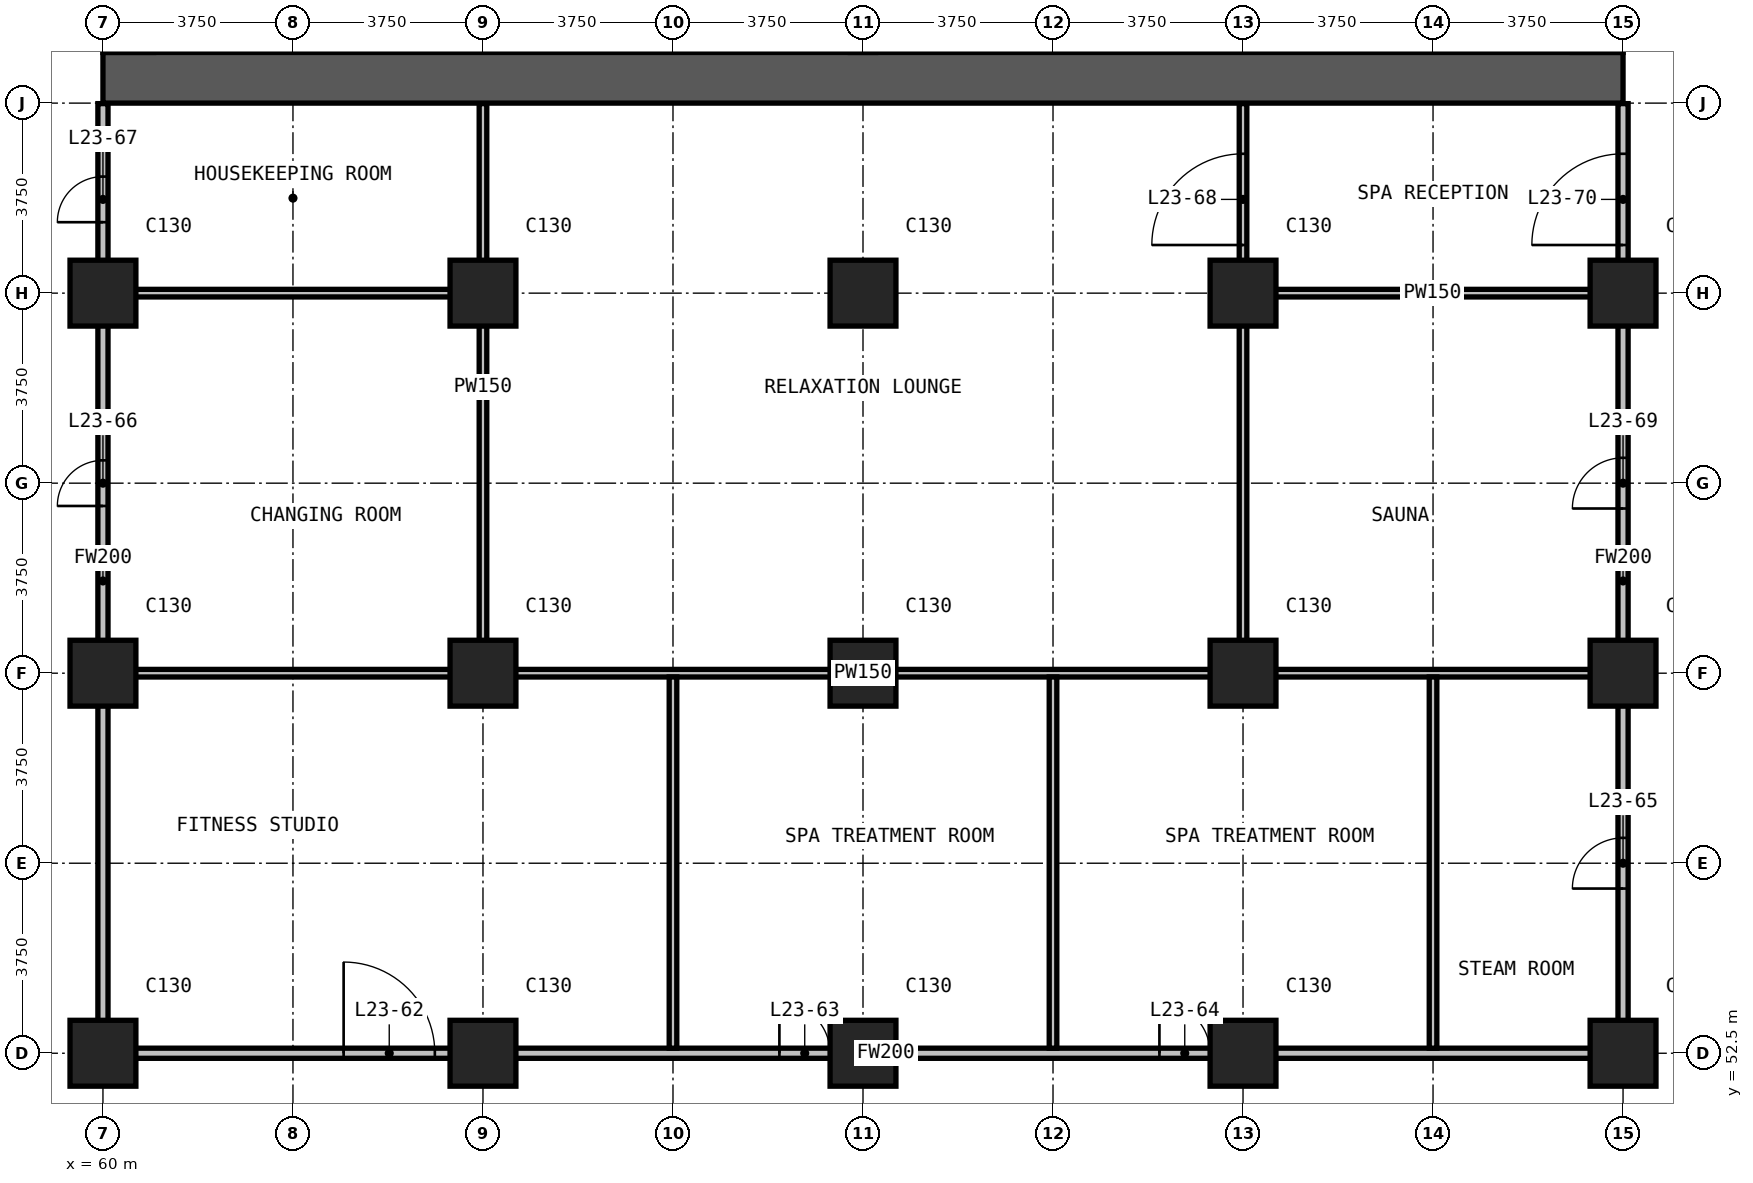
"""IFC4 building model, lengths in metres.
Left out: names, types, materials, properties, quantities, classifications, styles, units other than length and angle.
Written with IfcOpenShell. Run it as: python <this file> out.ifc"""

import sys

from ifc_helpers import new_model, si_unit, direction, frame, frame_2d, origin, origin_2d, place, context, subcontext, project, spatial, rectangle, extrude, element, fill, save


model = new_model("IFC4")
c1 = context("Model", 3, precision=1e-05, world=origin(), true_north=direction((0.0, 1.0)))
c2 = subcontext(c1, "Body", "Model", "MODEL_VIEW")
j1 = project(units=[si_unit("LENGTHUNIT", "METRE"), si_unit("PLANEANGLEUNIT", "RADIAN")], contexts=[c1])
p1 = place(None, origin())
s1 = spatial("IfcSite", under=j1, at=p1, CompositionType="ELEMENT")
p2 = place(p1, origin())
s2 = spatial("IfcBuilding", under=s1, at=p2, CompositionType="ELEMENT")
p3 = place(p2, frame((0.0, 0.0, 95.6)))
s3 = spatial("IfcBuildingStorey", under=s2, at=p3, CompositionType="ELEMENT", Elevation=95.6)
for number, where, z_axis, x_axis in (
    (1, (60.0, 52.5, 0.0), (0.0, 0.0, 1.0), (1.0, 0.0, 0.0)),
    (2, (60.0, 60.0, 0.0), (0.0, 0.0, 1.0), (1.0, 0.0, 0.0)),
    (3, (60.0, 67.5, 0.0), (0.0, 0.0, 1.0), (1.0, 0.0, 0.0)),
    (4, (67.5, 52.5, 0.0), (0.0, 0.0, 1.0), (1.0, 0.0, 0.0)),
    (5, (67.5, 60.0, 0.0), (0.0, 0.0, 1.0), (1.0, 0.0, 0.0)),
    (6, (67.5, 67.5, 0.0), (0.0, 0.0, 1.0), (1.0, 0.0, 0.0)),
    (7, (75.0, 52.5, 0.0), (0.0, 0.0, 1.0), (1.0, 0.0, 0.0)),
    (8, (75.0, 60.0, 0.0), (0.0, 0.0, 1.0), (1.0, 0.0, 0.0)),
    (9, (75.0, 67.5, 0.0), (0.0, 0.0, 1.0), (1.0, 0.0, 0.0)),
    (10, (82.5, 52.5, 0.0), (0.0, 0.0, 1.0), (1.0, 0.0, 0.0)),
    (11, (82.5, 60.0, 0.0), (0.0, 0.0, 1.0), (1.0, 0.0, 0.0)),
    (12, (82.5, 67.5, 0.0), (0.0, 0.0, 1.0), (1.0, 0.0, 0.0)),
    (13, (90.0, 52.5, 0.0), (0.0, 0.0, 1.0), (1.0, 0.0, 0.0)),
    (14, (90.0, 60.0, 0.0), (0.0, 0.0, 1.0), (1.0, 0.0, 0.0)),
    (15, (90.0, 67.5, 0.0), (0.0, 0.0, 1.0), (1.0, 0.0, 0.0)),
):
    element("IfcColumn", number, at=place(p3, frame(where, z_axis=z_axis, x_axis=x_axis)), inside=s3, PredefinedType="COLUMN", context=c2, shape_type="SweptSolid", body=[
        extrude(rectangle(XDim=1.3, YDim=1.3, at=origin_2d()), origin(), (0.0, 0.0, 1.0), 3.3),
    ])
p4 = place(p3, frame((60.0, 71.75, 0.0), z_axis=(0.0, 0.0, 1.0), x_axis=(1.0, 0.0, 0.0)))
e16 = element("IfcWall", 16, at=p4, inside=s3, PredefinedType="SHEAR", context=c2, shape_type="SweptSolid", body=[
    extrude(rectangle(XDim=30.0, YDim=1.0, at=frame_2d((15.0, 0.0))), origin(), (0.0, 0.0, 1.0), 3.3),
])
p5 = place(p3, frame((60.1, 52.5, 0.0), z_axis=(0.0, 0.0, 1.0), x_axis=(1.0, 0.0, 0.0)))
e17 = element("IfcWall", 17, at=p5, inside=s3, PredefinedType="PARTITIONING", context=c2, shape_type="SweptSolid", body=[
    extrude(rectangle(XDim=29.8, YDim=0.2, at=frame_2d((14.9, 0.0))), origin(), (0.0, 0.0, 1.0), 3.0),
])
p6 = place(p5, frame((4.65, 0.0, 0.0)))
e18 = element("IfcOpeningElement", 18, at=p6, cuts=e17, PredefinedType="OPENING", context=c2, shape_type="SweptSolid", body=[
    extrude(rectangle(XDim=1.8, YDim=2.2, at=frame_2d((0.9, 1.1))), frame((0.0, 0.11, 0.0), z_axis=(0.0, -1.0, 0.0), x_axis=(1.0, 0.0, 0.0)), (0.0, 0.0, 1.0), 0.22),
])
p7 = place(p5, frame((13.25, 0.0, 0.0)))
e19 = element("IfcOpeningElement", 19, at=p7, cuts=e17, PredefinedType="OPENING", context=c2, shape_type="SweptSolid", body=[
    extrude(rectangle(XDim=1.0, YDim=2.2, at=frame_2d((0.5, 1.1))), frame((0.0, 0.11, 0.0), z_axis=(0.0, -1.0, 0.0), x_axis=(1.0, 0.0, 0.0)), (0.0, 0.0, 1.0), 0.22),
])
p8 = place(p5, frame((20.75, 0.0, 0.0)))
e20 = element("IfcOpeningElement", 20, at=p8, cuts=e17, PredefinedType="OPENING", context=c2, shape_type="SweptSolid", body=[
    extrude(rectangle(XDim=1.0, YDim=2.2, at=frame_2d((0.5, 1.1))), frame((0.0, 0.11, 0.0), z_axis=(0.0, -1.0, 0.0), x_axis=(1.0, 0.0, 0.0)), (0.0, 0.0, 1.0), 0.22),
])
p9 = place(p3, frame((60.0, 52.4, 0.0), z_axis=(0.0, 0.0, 1.0), x_axis=(0.0, 1.0, 0.0)))
e21 = element("IfcWall", 21, at=p9, inside=s3, PredefinedType="PARTITIONING", context=c2, shape_type="SweptSolid", body=[
    extrude(rectangle(XDim=18.84, YDim=0.2, at=frame_2d((9.42, 0.0))), origin(), (0.0, 0.0, 1.0), 3.0),
])
p10 = place(p9, frame((10.9, 0.0, 0.0)))
e22 = element("IfcOpeningElement", 22, at=p10, cuts=e21, PredefinedType="OPENING", context=c2, shape_type="SweptSolid", body=[
    extrude(rectangle(XDim=0.9, YDim=2.2, at=frame_2d((0.45, 1.1))), frame((0.0, 0.11, 0.0), z_axis=(0.0, -1.0, 0.0), x_axis=(1.0, 0.0, 0.0)), (0.0, 0.0, 1.0), 0.22),
])
p11 = place(p9, frame((16.5, 0.0, 0.0)))
e23 = element("IfcOpeningElement", 23, at=p11, cuts=e21, PredefinedType="OPENING", context=c2, shape_type="SweptSolid", body=[
    extrude(rectangle(XDim=0.9, YDim=2.2, at=frame_2d((0.45, 1.1))), frame((0.0, 0.11, 0.0), z_axis=(0.0, -1.0, 0.0), x_axis=(1.0, 0.0, 0.0)), (0.0, 0.0, 1.0), 0.22),
])
p12 = place(p3, frame((90.0, 52.4, 0.0), z_axis=(0.0, 0.0, 1.0), x_axis=(0.0, 1.0, 0.0)))
e24 = element("IfcWall", 24, at=p12, inside=s3, PredefinedType="PARTITIONING", context=c2, shape_type="SweptSolid", body=[
    extrude(rectangle(XDim=18.84, YDim=0.2, at=frame_2d((9.42, 0.0))), origin(), (0.0, 0.0, 1.0), 3.0),
])
p13 = place(p12, frame((3.35, 0.0, 0.0)))
e25 = element("IfcOpeningElement", 25, at=p13, cuts=e24, PredefinedType="OPENING", context=c2, shape_type="SweptSolid", body=[
    extrude(rectangle(XDim=1.0, YDim=2.2, at=frame_2d((0.5, 1.1))), frame((0.0, 0.11, 0.0), z_axis=(0.0, -1.0, 0.0), x_axis=(1.0, 0.0, 0.0)), (0.0, 0.0, 1.0), 0.22),
])
p14 = place(p12, frame((10.85, 0.0, 0.0)))
e26 = element("IfcOpeningElement", 26, at=p14, cuts=e24, PredefinedType="OPENING", context=c2, shape_type="SweptSolid", body=[
    extrude(rectangle(XDim=1.0, YDim=2.2, at=frame_2d((0.5, 1.1))), frame((0.0, 0.11, 0.0), z_axis=(0.0, -1.0, 0.0), x_axis=(1.0, 0.0, 0.0)), (0.0, 0.0, 1.0), 0.22),
])
p15 = place(p12, frame((16.05, 0.0, 0.0)))
e27 = element("IfcOpeningElement", 27, at=p15, cuts=e24, PredefinedType="OPENING", context=c2, shape_type="SweptSolid", body=[
    extrude(rectangle(XDim=1.8, YDim=2.2, at=frame_2d((0.9, 1.1))), frame((0.0, 0.11, 0.0), z_axis=(0.0, -1.0, 0.0), x_axis=(1.0, 0.0, 0.0)), (0.0, 0.0, 1.0), 0.22),
])
p16 = place(p3, frame((60.1, 60.0, 0.0), z_axis=(0.0, 0.0, 1.0), x_axis=(1.0, 0.0, 0.0)))
e28 = element("IfcWall", 28, at=p16, inside=s3, PredefinedType="PARTITIONING", context=c2, shape_type="SweptSolid", body=[
    extrude(rectangle(XDim=29.8, YDim=0.15, at=frame_2d((14.9, 0.0))), origin(), (0.0, 0.0, 1.0), 3.0),
])
for number, where, z_axis, x_axis in (
    (29, (60.1, 67.5, 0.0), (0.0, 0.0, 1.0), (1.0, 0.0, 0.0)),
    (30, (82.575, 67.5, 0.0), (0.0, 0.0, 1.0), (1.0, 0.0, 0.0)),
):
    element("IfcWall", number, at=place(p3, frame(where, z_axis=z_axis, x_axis=x_axis)), inside=s3, PredefinedType="PARTITIONING", context=c2, shape_type="SweptSolid", body=[
        extrude(rectangle(XDim=7.325, YDim=0.15, at=frame_2d((3.663, 0.0))), origin(), (0.0, 0.0, 1.0), 3.0),
    ])
p17 = place(p3, frame((67.5, 60.075, 0.0), z_axis=(0.0, 0.0, 1.0), x_axis=(0.0, 1.0, 0.0)))
e31 = element("IfcWall", 31, at=p17, inside=s3, PredefinedType="PARTITIONING", context=c2, shape_type="SweptSolid", body=[
    extrude(rectangle(XDim=11.165, YDim=0.15, at=frame_2d((5.583, 0.0))), origin(), (0.0, 0.0, 1.0), 3.0),
])
for number, where, z_axis, x_axis in (
    (32, (71.25, 52.6, 0.0), (0.0, 0.0, 1.0), (0.0, 1.0, 0.0)),
    (33, (78.75, 52.6, 0.0), (0.0, 0.0, 1.0), (0.0, 1.0, 0.0)),
):
    element("IfcWall", number, at=place(p3, frame(where, z_axis=z_axis, x_axis=x_axis)), inside=s3, PredefinedType="PARTITIONING", context=c2, shape_type="SweptSolid", body=[
        extrude(rectangle(XDim=7.325, YDim=0.15, at=frame_2d((3.663, 0.0))), origin(), (0.0, 0.0, 1.0), 3.0),
    ])
p18 = place(p3, frame((82.5, 60.075, 0.0), z_axis=(0.0, 0.0, 1.0), x_axis=(0.0, 1.0, 0.0)))
e34 = element("IfcWall", 34, at=p18, inside=s3, PredefinedType="PARTITIONING", context=c2, shape_type="SweptSolid", body=[
    extrude(rectangle(XDim=11.165, YDim=0.15, at=frame_2d((5.583, 0.0))), origin(), (0.0, 0.0, 1.0), 3.0),
])
p19 = place(p18, frame((8.375, 0.0, 0.0)))
e35 = element("IfcOpeningElement", 35, at=p19, cuts=e34, PredefinedType="OPENING", context=c2, shape_type="SweptSolid", body=[
    extrude(rectangle(XDim=1.8, YDim=2.2, at=frame_2d((0.9, 1.1))), frame((0.0, 0.085, 0.0), z_axis=(0.0, -1.0, 0.0), x_axis=(1.0, 0.0, 0.0)), (0.0, 0.0, 1.0), 0.17),
])
p20 = place(p3, frame((86.25, 52.6, 0.0), z_axis=(0.0, 0.0, 1.0), x_axis=(0.0, 1.0, 0.0)))
e36 = element("IfcWall", 36, at=p20, inside=s3, PredefinedType="PARTITIONING", context=c2, shape_type="SweptSolid", body=[
    extrude(rectangle(XDim=7.325, YDim=0.15, at=frame_2d((3.663, 0.0))), origin(), (0.0, 0.0, 1.0), 3.0),
])
p21 = place(p6, origin())
e37 = element("IfcDoor", 37, at=p21, inside=s3, OperationType="DOUBLE_DOOR_SINGLE_SWING", PredefinedType="DOOR", context=c2, shape_type="SweptSolid", body=[
    extrude(rectangle(XDim=1.8, YDim=2.2, at=frame_2d((0.9, 1.1))), frame((0.0, 0.025, 0.0), z_axis=(0.0, -1.0, 0.0), x_axis=(1.0, 0.0, 0.0)), (0.0, 0.0, 1.0), 0.05),
])
fill(e18, e37)
p22 = place(p7, origin())
e38 = element("IfcDoor", 38, at=p22, inside=s3, OperationType="SINGLE_SWING_RIGHT", PredefinedType="DOOR", context=c2, shape_type="SweptSolid", body=[
    extrude(rectangle(XDim=1.0, YDim=2.2, at=frame_2d((0.5, 1.1))), frame((0.0, 0.025, 0.0), z_axis=(0.0, -1.0, 0.0), x_axis=(1.0, 0.0, 0.0)), (0.0, 0.0, 1.0), 0.05),
])
fill(e19, e38)
p23 = place(p8, origin())
e39 = element("IfcDoor", 39, at=p23, inside=s3, OperationType="SINGLE_SWING_RIGHT", PredefinedType="DOOR", context=c2, shape_type="SweptSolid", body=[
    extrude(rectangle(XDim=1.0, YDim=2.2, at=frame_2d((0.5, 1.1))), frame((0.0, 0.025, 0.0), z_axis=(0.0, -1.0, 0.0), x_axis=(1.0, 0.0, 0.0)), (0.0, 0.0, 1.0), 0.05),
])
fill(e20, e39)
p24 = place(p13, origin())
e40 = element("IfcDoor", 40, at=p24, inside=s3, OperationType="SINGLE_SWING_RIGHT", PredefinedType="DOOR", context=c2, shape_type="SweptSolid", body=[
    extrude(rectangle(XDim=1.0, YDim=2.2, at=frame_2d((0.5, 1.1))), frame((0.0, 0.025, 0.0), z_axis=(0.0, -1.0, 0.0), x_axis=(1.0, 0.0, 0.0)), (0.0, 0.0, 1.0), 0.05),
])
fill(e25, e40)
p25 = place(p10, origin())
e41 = element("IfcDoor", 41, at=p25, inside=s3, OperationType="SINGLE_SWING_LEFT", PredefinedType="DOOR", context=c2, shape_type="SweptSolid", body=[
    extrude(rectangle(XDim=0.9, YDim=2.2, at=frame_2d((0.45, 1.1))), frame((0.0, 0.025, 0.0), z_axis=(0.0, -1.0, 0.0), x_axis=(1.0, 0.0, 0.0)), (0.0, 0.0, 1.0), 0.05),
])
fill(e22, e41)
p26 = place(p11, origin())
e42 = element("IfcDoor", 42, at=p26, inside=s3, OperationType="SINGLE_SWING_LEFT", PredefinedType="DOOR", context=c2, shape_type="SweptSolid", body=[
    extrude(rectangle(XDim=0.9, YDim=2.2, at=frame_2d((0.45, 1.1))), frame((0.0, 0.025, 0.0), z_axis=(0.0, -1.0, 0.0), x_axis=(1.0, 0.0, 0.0)), (0.0, 0.0, 1.0), 0.05),
])
fill(e23, e42)
p27 = place(p19, origin())
e43 = element("IfcDoor", 43, at=p27, inside=s3, OperationType="DOUBLE_DOOR_SINGLE_SWING", PredefinedType="DOOR", context=c2, shape_type="SweptSolid", body=[
    extrude(rectangle(XDim=1.8, YDim=2.2, at=frame_2d((0.9, 1.1))), frame((0.0, 0.025, 0.0), z_axis=(0.0, -1.0, 0.0), x_axis=(1.0, 0.0, 0.0)), (0.0, 0.0, 1.0), 0.05),
])
fill(e35, e43)
p28 = place(p14, origin())
e44 = element("IfcDoor", 44, at=p28, inside=s3, OperationType="SINGLE_SWING_LEFT", PredefinedType="DOOR", context=c2, shape_type="SweptSolid", body=[
    extrude(rectangle(XDim=1.0, YDim=2.2, at=frame_2d((0.5, 1.1))), frame((0.0, 0.025, 0.0), z_axis=(0.0, -1.0, 0.0), x_axis=(1.0, 0.0, 0.0)), (0.0, 0.0, 1.0), 0.05),
])
fill(e26, e44)
p29 = place(p15, origin())
e45 = element("IfcDoor", 45, at=p29, inside=s3, OperationType="DOUBLE_DOOR_SINGLE_SWING", PredefinedType="DOOR", context=c2, shape_type="SweptSolid", body=[
    extrude(rectangle(XDim=1.8, YDim=2.2, at=frame_2d((0.9, 1.1))), frame((0.0, 0.025, 0.0), z_axis=(0.0, -1.0, 0.0), x_axis=(1.0, 0.0, 0.0)), (0.0, 0.0, 1.0), 0.05),
])
fill(e27, e45)
save(model, sys.argv[1])
